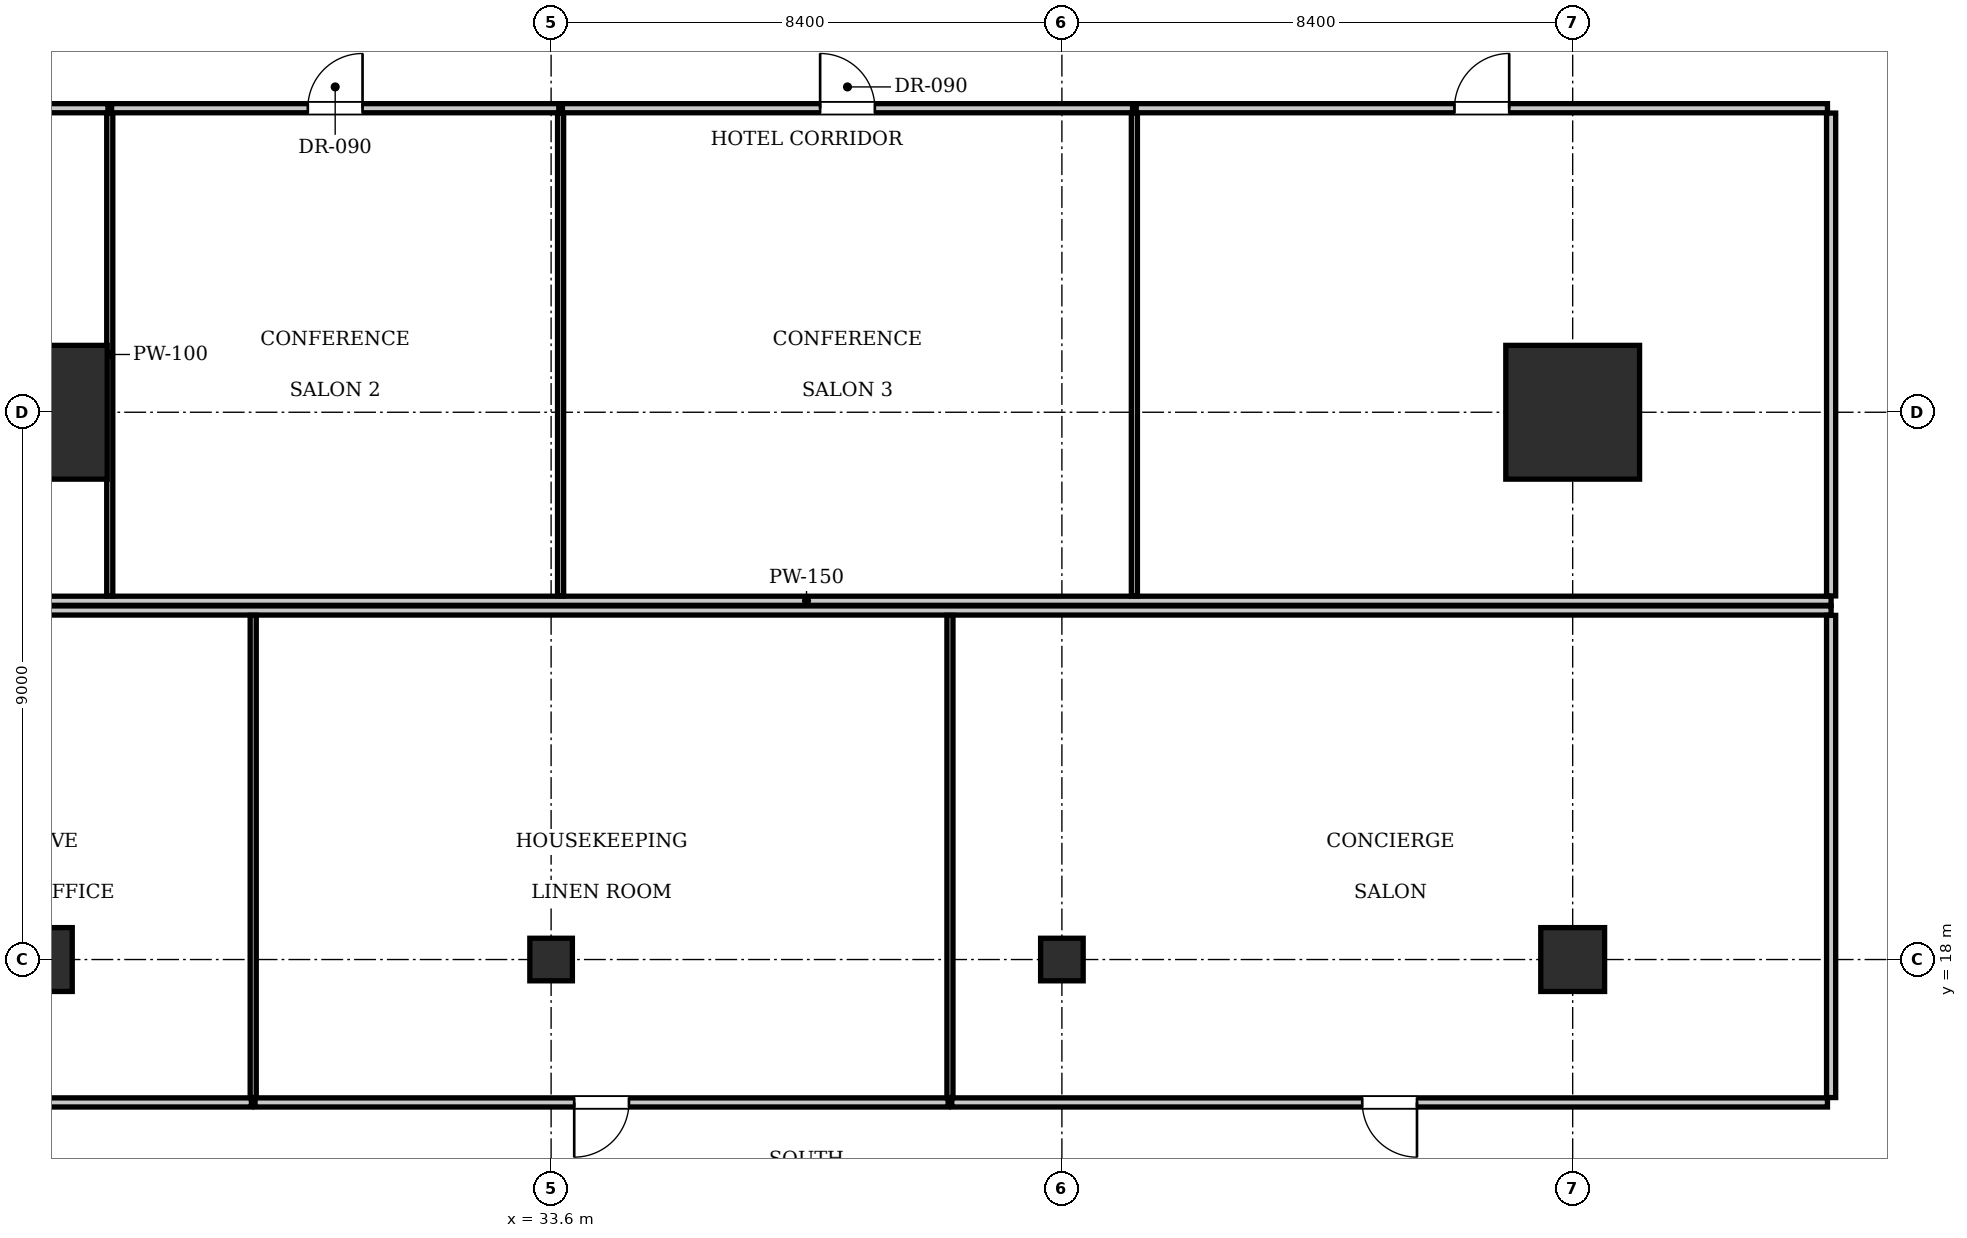
"""IFC4 building model, lengths in metres.
Left out: names, types, materials, properties, quantities, classifications, styles, units other than length and angle.
Written with IfcOpenShell. Run it as: python <this file> out.ifc"""

import sys

from ifc_helpers import new_model, si_unit, direction, frame, frame_2d, origin, origin_2d, place, context, subcontext, project, spatial, rectangle, i_section, extrude, element, fill, save


model = new_model("IFC4")
c1 = context("Model", 3, precision=1e-05, world=origin(), true_north=direction((0.0, 1.0)))
c2 = subcontext(c1, "Body", "Model", "MODEL_VIEW")
j1 = project(units=[si_unit("LENGTHUNIT", "METRE"), si_unit("PLANEANGLEUNIT", "RADIAN")], contexts=[c1])
p1 = place(None, origin())
s1 = spatial("IfcSite", under=j1, at=p1, CompositionType="ELEMENT")
p2 = place(p1, origin())
s2 = spatial("IfcBuilding", under=s1, at=p2, CompositionType="ELEMENT")
p3 = place(p2, frame((0.0, 0.0, 57.75)))
s3 = spatial("IfcBuildingStorey", under=s2, at=p3, CompositionType="ELEMENT", Elevation=57.75)
for number, where, z_axis, x_axis in (
    (1, (25.2, 27.0, 0.0), (0.0, 0.0, 1.0), (1.0, 0.0, 0.0)),
    (2, (50.4, 27.0, 0.0), (0.0, 0.0, 1.0), (1.0, 0.0, 0.0)),
):
    element("IfcColumn", number, at=place(p3, frame(where, z_axis=z_axis, x_axis=x_axis)), inside=s3, PredefinedType="COLUMN", context=c2, shape_type="SweptSolid", body=[
        extrude(rectangle(XDim=2.2, YDim=2.2, at=origin_2d()), origin(), (0.0, 0.0, 1.0), 3.85),
    ])
for number, where, z_axis, x_axis in (
    (3, (25.2, 18.0, 0.0), (0.0, 0.0, 1.0), (1.0, 0.0, 0.0)),
    (4, (50.4, 18.0, 0.0), (0.0, 0.0, 1.0), (1.0, 0.0, 0.0)),
):
    element("IfcColumn", number, at=place(p3, frame(where, z_axis=z_axis, x_axis=x_axis)), inside=s3, PredefinedType="COLUMN", context=c2, shape_type="SweptSolid", body=[
        extrude(rectangle(XDim=1.05, YDim=1.05, at=origin_2d()), origin(), (0.0, 0.0, 1.0), 3.85),
    ])
for number, where, z_axis, x_axis in (
    (5, (33.6, 18.0, 0.0), (0.0, 0.0, 1.0), (1.0, 0.0, 0.0)),
    (6, (42.0, 18.0, 0.0), (0.0, 0.0, 1.0), (1.0, 0.0, 0.0)),
):
    element("IfcColumn", number, at=place(p3, frame(where, z_axis=z_axis, x_axis=x_axis)), inside=s3, PredefinedType="COLUMN", context=c2, shape_type="SweptSolid", body=[
        extrude(i_section(OverallWidth=0.7, OverallDepth=0.7, WebThickness=0.028, FlangeThickness=0.044, at=origin_2d()), origin(), (0.0, 0.0, 1.0), 3.85),
    ])
p4 = place(p3, frame((20.95, 23.9, 0.0), z_axis=(0.0, 0.0, 1.0), x_axis=(1.0, 0.0, 0.0)))
e7 = element("IfcWall", 7, at=p4, inside=s3, PredefinedType="PARTITIONING", context=c2, shape_type="SweptSolid", body=[
    extrude(rectangle(XDim=33.7, YDim=0.15, at=frame_2d((16.85, 0.0))), origin(), (0.0, 0.0, 1.0), 3.61),
])
p5 = place(p3, frame((54.65, 23.98, 0.0), z_axis=(0.0, 0.0, 1.0), x_axis=(0.0, 1.0, 0.0)))
e8 = element("IfcWall", 8, at=p5, inside=s3, PredefinedType="PARTITIONING", context=c2, shape_type="SweptSolid", body=[
    extrude(rectangle(XDim=7.94, YDim=0.15, at=frame_2d((3.97, 0.0))), origin(), (0.0, 0.0, 1.0), 3.255),
])
p6 = place(p3, frame((21.01, 32.0, 0.0), z_axis=(0.0, 0.0, 1.0), x_axis=(1.0, 0.0, 0.0)))
e9 = element("IfcWall", 9, at=p6, inside=s3, PredefinedType="PARTITIONING", context=c2, shape_type="SweptSolid", body=[
    extrude(rectangle(XDim=5.302, YDim=0.15, at=frame_2d((2.651, 0.0))), origin(), (0.0, 0.0, 1.0), 3.61),
])
p7 = place(p6, frame((2.201, 0.0, 0.0)))
e10 = element("IfcOpeningElement", 10, at=p7, cuts=e9, PredefinedType="OPENING", context=c2, shape_type="SweptSolid", body=[
    extrude(rectangle(XDim=0.9, YDim=2.1, at=frame_2d((0.45, 1.05))), frame((0.0, 0.085, 0.0), z_axis=(0.0, -1.0, 0.0), x_axis=(1.0, 0.0, 0.0)), (0.0, 0.0, 1.0), 0.17),
])
p8 = place(p3, frame((26.342, 23.98, 0.0), z_axis=(0.0, 0.0, 1.0), x_axis=(0.0, 1.0, 0.0)))
e11 = element("IfcWall", 11, at=p8, inside=s3, PredefinedType="PARTITIONING", context=c2, shape_type="SweptSolid", body=[
    extrude(rectangle(XDim=7.94, YDim=0.1, at=frame_2d((3.97, 0.0))), origin(), (0.0, 0.0, 1.0), 3.61),
])
p9 = place(p3, frame((26.372, 32.0, 0.0), z_axis=(0.0, 0.0, 1.0), x_axis=(1.0, 0.0, 0.0)))
e12 = element("IfcWall", 12, at=p9, inside=s3, PredefinedType="PARTITIONING", context=c2, shape_type="SweptSolid", body=[
    extrude(rectangle(XDim=7.354, YDim=0.15, at=frame_2d((3.677, 0.0))), origin(), (0.0, 0.0, 1.0), 3.61),
])
p10 = place(p9, frame((3.227, 0.0, 0.0)))
e13 = element("IfcOpeningElement", 13, at=p10, cuts=e12, PredefinedType="OPENING", context=c2, shape_type="SweptSolid", body=[
    extrude(rectangle(XDim=0.9, YDim=2.1, at=frame_2d((0.45, 1.05))), frame((0.0, 0.085, 0.0), z_axis=(0.0, -1.0, 0.0), x_axis=(1.0, 0.0, 0.0)), (0.0, 0.0, 1.0), 0.17),
])
p11 = place(p3, frame((33.756, 23.98, 0.0), z_axis=(0.0, 0.0, 1.0), x_axis=(0.0, 1.0, 0.0)))
e14 = element("IfcWall", 14, at=p11, inside=s3, PredefinedType="PARTITIONING", context=c2, shape_type="SweptSolid", body=[
    extrude(rectangle(XDim=7.94, YDim=0.1, at=frame_2d((3.97, 0.0))), origin(), (0.0, 0.0, 1.0), 2.988),
])
p12 = place(p3, frame((33.786, 32.0, 0.0), z_axis=(0.0, 0.0, 1.0), x_axis=(1.0, 0.0, 0.0)))
e15 = element("IfcWall", 15, at=p12, inside=s3, PredefinedType="PARTITIONING", context=c2, shape_type="SweptSolid", body=[
    extrude(rectangle(XDim=9.376, YDim=0.15, at=frame_2d((4.688, 0.0))), origin(), (0.0, 0.0, 1.0), 3.61),
])
p13 = place(p12, frame((4.238, 0.0, 0.0)))
e16 = element("IfcOpeningElement", 16, at=p13, cuts=e15, PredefinedType="OPENING", context=c2, shape_type="SweptSolid", body=[
    extrude(rectangle(XDim=0.9, YDim=2.1, at=frame_2d((0.45, 1.05))), frame((0.0, 0.085, 0.0), z_axis=(0.0, -1.0, 0.0), x_axis=(1.0, 0.0, 0.0)), (0.0, 0.0, 1.0), 0.17),
])
p14 = place(p3, frame((43.192, 23.98, 0.0), z_axis=(0.0, 0.0, 1.0), x_axis=(0.0, 1.0, 0.0)))
e17 = element("IfcWall", 17, at=p14, inside=s3, PredefinedType="PARTITIONING", context=c2, shape_type="SweptSolid", body=[
    extrude(rectangle(XDim=7.94, YDim=0.1, at=frame_2d((3.97, 0.0))), origin(), (0.0, 0.0, 1.0), 3.61),
])
p15 = place(p3, frame((43.222, 32.0, 0.0), z_axis=(0.0, 0.0, 1.0), x_axis=(1.0, 0.0, 0.0)))
e18 = element("IfcWall", 18, at=p15, inside=s3, PredefinedType="PARTITIONING", context=c2, shape_type="SweptSolid", body=[
    extrude(rectangle(XDim=11.368, YDim=0.15, at=frame_2d((5.684, 0.0))), origin(), (0.0, 0.0, 1.0), 3.61),
])
p16 = place(p15, frame((5.234, 0.0, 0.0)))
e19 = element("IfcOpeningElement", 19, at=p16, cuts=e18, PredefinedType="OPENING", context=c2, shape_type="SweptSolid", body=[
    extrude(rectangle(XDim=0.9, YDim=2.1, at=frame_2d((0.45, 1.05))), frame((0.0, 0.085, 0.0), z_axis=(0.0, -1.0, 0.0), x_axis=(1.0, 0.0, 0.0)), (0.0, 0.0, 1.0), 0.17),
])
p17 = place(p3, frame((20.95, 23.74, 0.0), z_axis=(0.0, 0.0, 1.0), x_axis=(1.0, 0.0, 0.0)))
e20 = element("IfcWall", 20, at=p17, inside=s3, PredefinedType="PARTITIONING", context=c2, shape_type="SweptSolid", body=[
    extrude(rectangle(XDim=33.7, YDim=0.15, at=frame_2d((16.85, 0.0))), origin(), (0.0, 0.0, 1.0), 3.61),
])
p18 = place(p3, frame((54.65, 15.73, 0.0), z_axis=(0.0, 0.0, 1.0), x_axis=(0.0, 1.0, 0.0)))
e21 = element("IfcWall", 21, at=p18, inside=s3, PredefinedType="PARTITIONING", context=c2, shape_type="SweptSolid", body=[
    extrude(rectangle(XDim=7.93, YDim=0.15, at=frame_2d((3.965, 0.0))), origin(), (0.0, 0.0, 1.0), 3.255),
])
p19 = place(p3, frame((21.01, 15.65, 0.0), z_axis=(0.0, 0.0, 1.0), x_axis=(1.0, 0.0, 0.0)))
e22 = element("IfcWall", 22, at=p19, inside=s3, PredefinedType="PARTITIONING", context=c2, shape_type="SweptSolid", body=[
    extrude(rectangle(XDim=7.661, YDim=0.15, at=frame_2d((3.831, 0.0))), origin(), (0.0, 0.0, 1.0), 3.61),
])
p20 = place(p19, frame((3.381, 0.0, 0.0)))
e23 = element("IfcOpeningElement", 23, at=p20, cuts=e22, PredefinedType="OPENING", context=c2, shape_type="SweptSolid", body=[
    extrude(rectangle(XDim=0.9, YDim=2.1, at=frame_2d((0.45, 1.05))), frame((0.0, 0.085, 0.0), z_axis=(0.0, -1.0, 0.0), x_axis=(1.0, 0.0, 0.0)), (0.0, 0.0, 1.0), 0.17),
])
p21 = place(p3, frame((28.701, 15.73, 0.0), z_axis=(0.0, 0.0, 1.0), x_axis=(0.0, 1.0, 0.0)))
e24 = element("IfcWall", 24, at=p21, inside=s3, PredefinedType="PARTITIONING", context=c2, shape_type="SweptSolid", body=[
    extrude(rectangle(XDim=7.93, YDim=0.1, at=frame_2d((3.965, 0.0))), origin(), (0.0, 0.0, 1.0), 3.61),
])
p22 = place(p3, frame((28.731, 15.65, 0.0), z_axis=(0.0, 0.0, 1.0), x_axis=(1.0, 0.0, 0.0)))
e25 = element("IfcWall", 25, at=p22, inside=s3, PredefinedType="PARTITIONING", context=c2, shape_type="SweptSolid", body=[
    extrude(rectangle(XDim=11.398, YDim=0.15, at=frame_2d((5.699, 0.0))), origin(), (0.0, 0.0, 1.0), 3.61),
])
p23 = place(p22, frame((5.249, 0.0, 0.0)))
e26 = element("IfcOpeningElement", 26, at=p23, cuts=e25, PredefinedType="OPENING", context=c2, shape_type="SweptSolid", body=[
    extrude(rectangle(XDim=0.9, YDim=2.1, at=frame_2d((0.45, 1.05))), frame((0.0, 0.085, 0.0), z_axis=(0.0, -1.0, 0.0), x_axis=(1.0, 0.0, 0.0)), (0.0, 0.0, 1.0), 0.17),
])
p24 = place(p3, frame((40.159, 15.73, 0.0), z_axis=(0.0, 0.0, 1.0), x_axis=(0.0, 1.0, 0.0)))
e27 = element("IfcWall", 27, at=p24, inside=s3, PredefinedType="PARTITIONING", context=c2, shape_type="SweptSolid", body=[
    extrude(rectangle(XDim=7.93, YDim=0.1, at=frame_2d((3.965, 0.0))), origin(), (0.0, 0.0, 1.0), 3.61),
])
p25 = place(p3, frame((40.189, 15.65, 0.0), z_axis=(0.0, 0.0, 1.0), x_axis=(1.0, 0.0, 0.0)))
e28 = element("IfcWall", 28, at=p25, inside=s3, PredefinedType="PARTITIONING", context=c2, shape_type="SweptSolid", body=[
    extrude(rectangle(XDim=14.401, YDim=0.15, at=frame_2d((7.201, 0.0))), origin(), (0.0, 0.0, 1.0), 3.61),
])
p26 = place(p25, frame((6.75, 0.0, 0.0)))
e29 = element("IfcOpeningElement", 29, at=p26, cuts=e28, PredefinedType="OPENING", context=c2, shape_type="SweptSolid", body=[
    extrude(rectangle(XDim=0.9, YDim=2.1, at=frame_2d((0.45, 1.05))), frame((0.0, 0.085, 0.0), z_axis=(0.0, -1.0, 0.0), x_axis=(1.0, 0.0, 0.0)), (0.0, 0.0, 1.0), 0.17),
])
p27 = place(p10, origin())
e30 = element("IfcDoor", 30, at=p27, inside=s3, OperationType="SINGLE_SWING_RIGHT", PredefinedType="DOOR", context=c2, shape_type="SweptSolid", body=[
    extrude(rectangle(XDim=0.9, YDim=2.1, at=frame_2d((0.45, 1.05))), frame((0.0, 0.025, 0.0), z_axis=(0.0, -1.0, 0.0), x_axis=(1.0, 0.0, 0.0)), (0.0, 0.0, 1.0), 0.05),
])
fill(e13, e30)
p28 = place(p13, origin())
e31 = element("IfcDoor", 31, at=p28, inside=s3, OperationType="SINGLE_SWING_LEFT", PredefinedType="DOOR", context=c2, shape_type="SweptSolid", body=[
    extrude(rectangle(XDim=0.9, YDim=2.1, at=frame_2d((0.45, 1.05))), frame((0.0, 0.025, 0.0), z_axis=(0.0, -1.0, 0.0), x_axis=(1.0, 0.0, 0.0)), (0.0, 0.0, 1.0), 0.05),
])
fill(e16, e31)
p29 = place(p16, origin())
e32 = element("IfcDoor", 32, at=p29, inside=s3, OperationType="SINGLE_SWING_RIGHT", PredefinedType="DOOR", context=c2, shape_type="SweptSolid", body=[
    extrude(rectangle(XDim=0.9, YDim=2.1, at=frame_2d((0.45, 1.05))), frame((0.0, 0.025, 0.0), z_axis=(0.0, -1.0, 0.0), x_axis=(1.0, 0.0, 0.0)), (0.0, 0.0, 1.0), 0.05),
])
fill(e19, e32)
p30 = place(p23, frame((0.9, 0.0, 0.0), z_axis=(0.0, 0.0, 1.0), x_axis=(-1.0, 0.0, 0.0)))
e33 = element("IfcDoor", 33, at=p30, inside=s3, OperationType="SINGLE_SWING_RIGHT", PredefinedType="DOOR", context=c2, shape_type="SweptSolid", body=[
    extrude(rectangle(XDim=0.9, YDim=2.1, at=frame_2d((0.45, 1.05))), frame((0.0, 0.025, 0.0), z_axis=(0.0, -1.0, 0.0), x_axis=(1.0, 0.0, 0.0)), (0.0, 0.0, 1.0), 0.05),
])
fill(e26, e33)
p31 = place(p26, frame((0.9, 0.0, 0.0), z_axis=(0.0, 0.0, 1.0), x_axis=(-1.0, 0.0, 0.0)))
e34 = element("IfcDoor", 34, at=p31, inside=s3, OperationType="SINGLE_SWING_LEFT", PredefinedType="DOOR", context=c2, shape_type="SweptSolid", body=[
    extrude(rectangle(XDim=0.9, YDim=2.1, at=frame_2d((0.45, 1.05))), frame((0.0, 0.025, 0.0), z_axis=(0.0, -1.0, 0.0), x_axis=(1.0, 0.0, 0.0)), (0.0, 0.0, 1.0), 0.05),
])
fill(e29, e34)
save(model, sys.argv[1])
